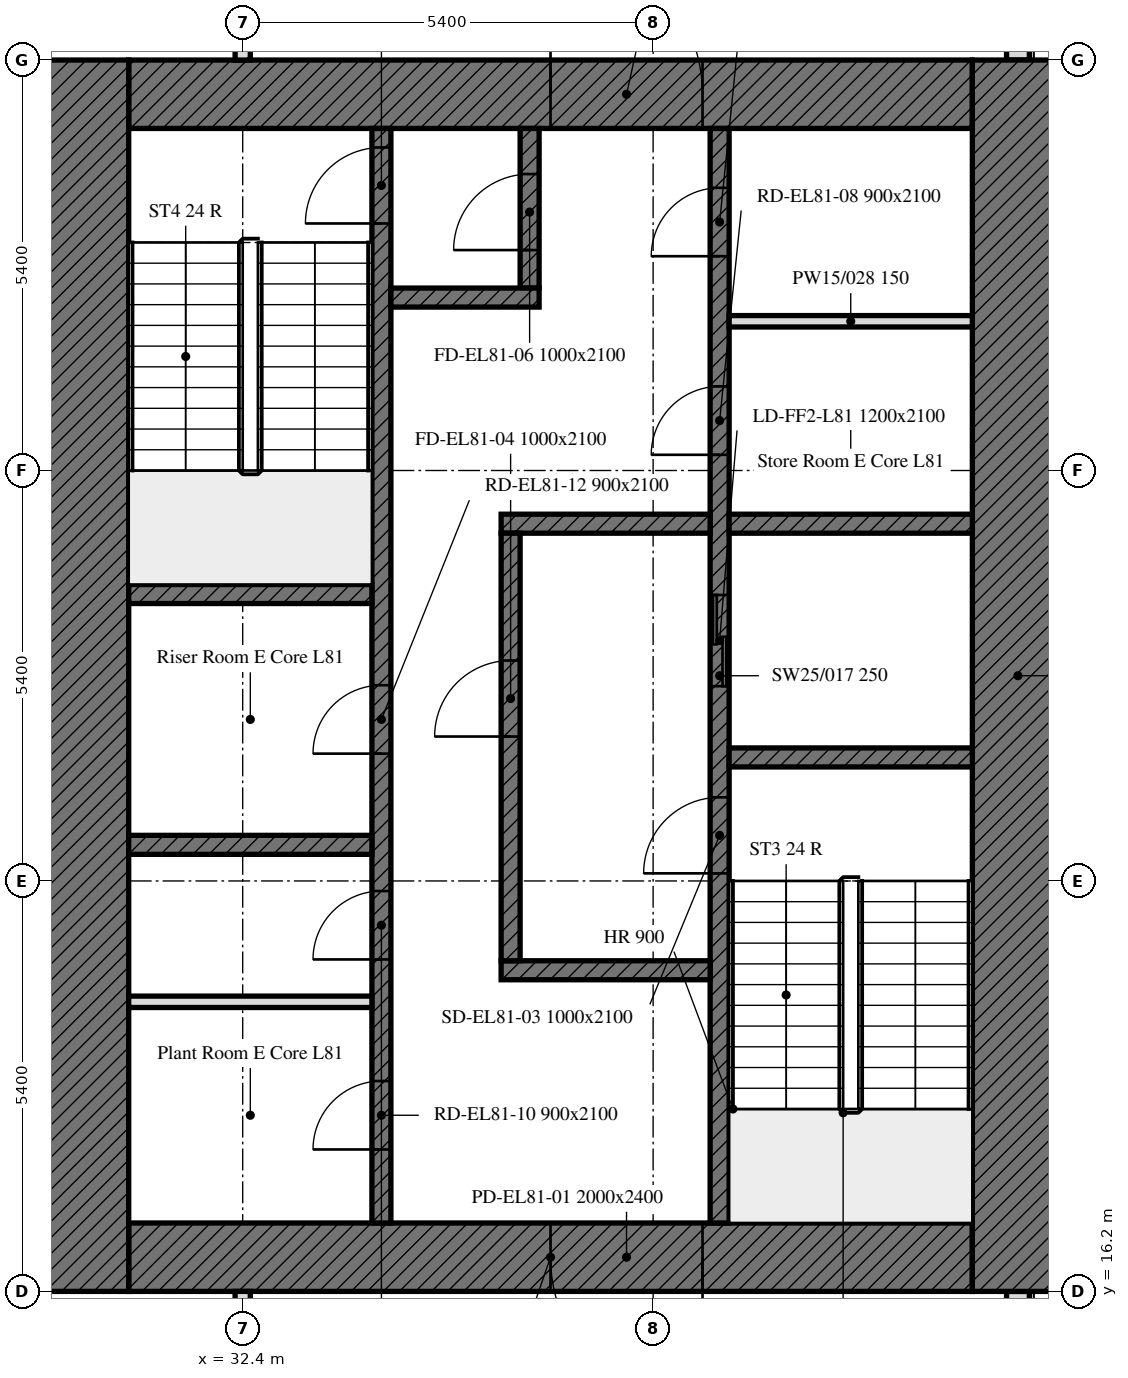
"""IFC4 building model, lengths in metres.
Left out: names, types, materials, properties, quantities, classifications, styles, units other than length and angle.
Written with IfcOpenShell. Run it as: python <this file> out.ifc"""

import sys

from ifc_helpers import new_model, si_unit, direction, frame, frame_2d, origin, place, context, subcontext, project, spatial, polyline, rectangle, outline, extrude, element, fill, save


model = new_model("IFC4")
c1 = context("Model", 3, precision=1e-05, world=origin(), true_north=direction((0.0, 1.0)))
c2 = subcontext(c1, "Body", "Model", "MODEL_VIEW")
j1 = project(units=[si_unit("LENGTHUNIT", "METRE"), si_unit("PLANEANGLEUNIT", "RADIAN")], contexts=[c1])
p1 = place(None, origin())
s1 = spatial("IfcSite", under=j1, at=p1, CompositionType="ELEMENT")
p2 = place(p1, origin())
s2 = spatial("IfcBuilding", under=s1, at=p2, CompositionType="ELEMENT")
p3 = place(p2, frame((0.0, 0.0, 326.2)))
s3 = spatial("IfcBuildingStorey", under=s2, at=p3, CompositionType="ELEMENT", Elevation=326.2)
p4 = place(p3, frame((42.6, 10.986, 0.0), z_axis=(0.0, 0.0, 1.0), x_axis=(0.0, 1.0, 0.0)))
e1 = element("IfcWall", 1, at=p4, inside=s3, PredefinedType="SOLIDWALL", context=c2, shape_type="SweptSolid", body=[
    extrude(outline(polyline([(0.0, 0.0), (5.214, 0.0), (5.214, 4.2), (4.634, 4.2), (4.055, 4.2), (3.476, 4.2), (2.896, 4.2), (2.317, 4.2), (1.738, 4.2), (1.159, 4.2), (0.579, 4.2), (0.0, 4.2), (0.0, 0.0)])), frame((0.0, 0.15, 0.0), z_axis=(0.0, -1.0, 0.0), x_axis=(1.0, 0.0, 0.0)), (0.0, 0.0, 1.0), 0.3),
])
p5 = place(p4, frame((1.014, 0.0, 0.6)))
e2 = element("IfcOpeningElement", 2, at=p5, cuts=e1, PredefinedType="OPENING", context=c2, shape_type="SweptSolid", body=[
    extrude(rectangle(XDim=3.0, YDim=1.8, at=frame_2d((1.5, 0.9))), frame((0.0, 0.16, 0.0), z_axis=(0.0, -1.0, 0.0), x_axis=(1.0, 0.0, 0.0)), (0.0, 0.0, 1.0), 0.32),
])
p6 = place(p3, frame((42.6, 32.4, 0.0), z_axis=(0.0, 0.0, 1.0), x_axis=(0.0, 1.0, 0.0)))
e3 = element("IfcWall", 3, at=p6, inside=s3, PredefinedType="SOLIDWALL", context=c2, shape_type="SweptSolid", body=[
    extrude(outline(polyline([(0.0, 0.0), (10.614, 0.0), (10.614, 4.2), (10.024, 4.2), (9.434, 4.2), (8.845, 4.2), (8.255, 4.2), (7.665, 4.2), (7.076, 4.2), (6.486, 4.2), (5.896, 4.2), (5.307, 4.2), (4.717, 4.2), (4.127, 4.2), (3.538, 4.2), (2.948, 4.2), (2.359, 4.2), (1.769, 4.2), (1.179, 4.2), (0.59, 4.2), (0.0, 4.2), (0.0, 0.0)])), frame((0.0, 0.15, 0.0), z_axis=(0.0, -1.0, 0.0), x_axis=(1.0, 0.0, 0.0)), (0.0, 0.0, 1.0), 0.3),
])
p7 = place(p6, frame((1.2, 0.0, 0.6)))
e4 = element("IfcOpeningElement", 4, at=p7, cuts=e3, PredefinedType="OPENING", context=c2, shape_type="SweptSolid", body=[
    extrude(rectangle(XDim=3.0, YDim=1.8, at=frame_2d((1.5, 0.9))), frame((0.0, 0.16, 0.0), z_axis=(0.0, -1.0, 0.0), x_axis=(1.0, 0.0, 0.0)), (0.0, 0.0, 1.0), 0.32),
])
p8 = place(p6, frame((7.396, 0.0, 0.6)))
e5 = element("IfcOpeningElement", 5, at=p8, cuts=e3, PredefinedType="OPENING", context=c2, shape_type="SweptSolid", body=[
    extrude(rectangle(XDim=1.4, YDim=1.8, at=frame_2d((0.7, 0.9))), frame((0.0, 0.16, 0.0), z_axis=(0.0, -1.0, 0.0), x_axis=(1.0, 0.0, 0.0)), (0.0, 0.0, 1.0), 0.32),
])
p9 = place(p3, frame((42.0, 16.65, 0.0), z_axis=(0.0, 0.0, 1.0), x_axis=(-1.0, 0.0, 0.0)))
e6 = element("IfcWall", 6, at=p9, inside=s3, PredefinedType="SOLIDWALL", context=c2, shape_type="SweptSolid", body=[
    extrude(rectangle(XDim=11.1, YDim=0.9, at=frame_2d((5.55, 0.0))), origin(), (0.0, 0.0, 1.0), 4.2),
])
p10 = place(p9, frame((3.55, 0.0, 0.0)))
e7 = element("IfcOpeningElement", 7, at=p10, cuts=e6, PredefinedType="OPENING", context=c2, shape_type="SweptSolid", body=[
    extrude(rectangle(XDim=2.0, YDim=2.4, at=frame_2d((1.0, 1.2))), frame((0.0, 0.45, 0.0), z_axis=(0.0, -1.0, 0.0), x_axis=(1.0, 0.0, 0.0)), (0.0, 0.0, 1.0), 0.9),
])
p11 = place(p3, frame((30.9, 31.95, 0.0), z_axis=(0.0, 0.0, 1.0), x_axis=(1.0, 0.0, 0.0)))
e8 = element("IfcWall", 8, at=p11, inside=s3, PredefinedType="SOLIDWALL", context=c2, shape_type="SweptSolid", body=[
    extrude(rectangle(XDim=11.1, YDim=0.9, at=frame_2d((5.55, 0.0))), origin(), (0.0, 0.0, 1.0), 4.2),
])
p12 = place(p11, frame((5.55, 0.0, 0.0)))
e9 = element("IfcOpeningElement", 9, at=p12, cuts=e8, PredefinedType="OPENING", context=c2, shape_type="SweptSolid", body=[
    extrude(rectangle(XDim=2.0, YDim=2.4, at=frame_2d((1.0, 1.2))), frame((0.0, 0.45, 0.0), z_axis=(0.0, -1.0, 0.0), x_axis=(1.0, 0.0, 0.0)), (0.0, 0.0, 1.0), 0.9),
])
for number, where, z_axis, x_axis in (
    (10, (42.6, 32.4, 0.0), (0.0, 0.0, 1.0), (0.0, -1.0, 0.0)),
    (11, (30.3, 16.2, 0.0), (0.0, 0.0, 1.0), (0.0, 1.0, 0.0)),
):
    element("IfcWall", number, at=place(p3, frame(where, z_axis=z_axis, x_axis=x_axis)), inside=s3, PredefinedType="SOLIDWALL", context=c2, shape_type="SweptSolid", body=[
        extrude(rectangle(XDim=16.2, YDim=1.2, at=frame_2d((8.1, 0.0))), origin(), (0.0, 0.0, 1.0), 4.2),
    ])
p13 = place(p3, frame((38.675, 17.1, 0.0), z_axis=(0.0, 0.0, 1.0), x_axis=(0.0, 1.0, 0.0)))
e12 = element("IfcWall", 12, at=p13, inside=s3, PredefinedType="SOLIDWALL", context=c2, shape_type="SweptSolid", body=[
    extrude(rectangle(XDim=14.4, YDim=0.25, at=frame_2d((7.2, 0.0))), origin(), (0.0, 0.0, 1.0), 4.2),
])
p14 = place(p13, frame((4.6, 0.0, 0.0)))
e13 = element("IfcOpeningElement", 13, at=p14, cuts=e12, PredefinedType="OPENING", context=c2, shape_type="SweptSolid", body=[
    extrude(rectangle(XDim=1.0, YDim=2.1, at=frame_2d((0.5, 1.05))), frame((0.0, 0.125, 0.0), z_axis=(0.0, -1.0, 0.0), x_axis=(1.0, 0.0, 0.0)), (0.0, 0.0, 1.0), 0.25),
])
p15 = place(p13, frame((7.062, 0.0, 0.0)))
e14 = element("IfcOpeningElement", 14, at=p15, cuts=e12, PredefinedType="OPENING", context=c2, shape_type="SweptSolid", body=[
    extrude(rectangle(XDim=1.2, YDim=2.1, at=frame_2d((0.6, 1.05))), frame((0.0, 0.125, 0.0), z_axis=(0.0, -1.0, 0.0), x_axis=(1.0, 0.0, 0.0)), (0.0, 0.0, 1.0), 0.25),
])
p16 = place(p13, frame((10.106, 0.0, 0.0)))
e15 = element("IfcOpeningElement", 15, at=p16, cuts=e12, PredefinedType="OPENING", context=c2, shape_type="SweptSolid", body=[
    extrude(rectangle(XDim=0.9, YDim=2.1, at=frame_2d((0.45, 1.05))), frame((0.0, 0.125, 0.0), z_axis=(0.0, -1.0, 0.0), x_axis=(1.0, 0.0, 0.0)), (0.0, 0.0, 1.0), 0.25),
])
p17 = place(p13, frame((12.719, 0.0, 0.0)))
e16 = element("IfcOpeningElement", 16, at=p17, cuts=e12, PredefinedType="OPENING", context=c2, shape_type="SweptSolid", body=[
    extrude(rectangle(XDim=0.9, YDim=2.1, at=frame_2d((0.45, 1.05))), frame((0.0, 0.125, 0.0), z_axis=(0.0, -1.0, 0.0), x_axis=(1.0, 0.0, 0.0)), (0.0, 0.0, 1.0), 0.25),
])
p18 = place(p3, frame((34.225, 17.1, 0.0), z_axis=(0.0, 0.0, 1.0), x_axis=(0.0, 1.0, 0.0)))
e17 = element("IfcWall", 17, at=p18, inside=s3, PredefinedType="SOLIDWALL", context=c2, shape_type="SweptSolid", body=[
    extrude(rectangle(XDim=14.4, YDim=0.25, at=frame_2d((7.2, 0.0))), origin(), (0.0, 0.0, 1.0), 4.2),
])
p19 = place(p18, frame((13.15, 0.0, 0.0)))
e18 = element("IfcOpeningElement", 18, at=p19, cuts=e17, PredefinedType="OPENING", context=c2, shape_type="SweptSolid", body=[
    extrude(rectangle(XDim=1.0, YDim=2.1, at=frame_2d((0.5, 1.05))), frame((0.0, 0.125, 0.0), z_axis=(0.0, -1.0, 0.0), x_axis=(1.0, 0.0, 0.0)), (0.0, 0.0, 1.0), 0.25),
])
p20 = place(p18, frame((0.968, 0.0, 0.0)))
e19 = element("IfcOpeningElement", 19, at=p20, cuts=e17, PredefinedType="OPENING", context=c2, shape_type="SweptSolid", body=[
    extrude(rectangle(XDim=0.9, YDim=2.1, at=frame_2d((0.45, 1.05))), frame((0.0, 0.125, 0.0), z_axis=(0.0, -1.0, 0.0), x_axis=(1.0, 0.0, 0.0)), (0.0, 0.0, 1.0), 0.25),
])
p21 = place(p18, frame((3.468, 0.0, 0.0)))
e20 = element("IfcOpeningElement", 20, at=p21, cuts=e17, PredefinedType="OPENING", context=c2, shape_type="SweptSolid", body=[
    extrude(rectangle(XDim=0.9, YDim=2.1, at=frame_2d((0.45, 1.05))), frame((0.0, 0.125, 0.0), z_axis=(0.0, -1.0, 0.0), x_axis=(1.0, 0.0, 0.0)), (0.0, 0.0, 1.0), 0.25),
])
p22 = place(p18, frame((6.175, 0.0, 0.0)))
e21 = element("IfcOpeningElement", 21, at=p22, cuts=e17, PredefinedType="OPENING", context=c2, shape_type="SweptSolid", body=[
    extrude(rectangle(XDim=0.9, YDim=2.1, at=frame_2d((0.45, 1.05))), frame((0.0, 0.125, 0.0), z_axis=(0.0, -1.0, 0.0), x_axis=(1.0, 0.0, 0.0)), (0.0, 0.0, 1.0), 0.25),
])
p23 = place(p3, frame((38.8, 23.225, 0.0), z_axis=(0.0, 0.0, 1.0), x_axis=(1.0, 0.0, 0.0)))
e22 = element("IfcWall", 22, at=p23, inside=s3, PredefinedType="SOLIDWALL", context=c2, shape_type="SweptSolid", body=[
    extrude(rectangle(XDim=3.2, YDim=0.25, at=frame_2d((1.6, 0.0))), origin(), (0.0, 0.0, 1.0), 4.2),
])
for number, where, z_axis, x_axis in (
    (23, (30.9, 25.375, 0.0), (0.0, 0.0, 1.0), (1.0, 0.0, 0.0)),
    (24, (30.9, 22.075, 0.0), (0.0, 0.0, 1.0), (1.0, 0.0, 0.0)),
):
    element("IfcWall", number, at=place(p3, frame(where, z_axis=z_axis, x_axis=x_axis)), inside=s3, PredefinedType="SOLIDWALL", context=c2, shape_type="SweptSolid", body=[
        extrude(rectangle(XDim=3.2, YDim=0.25, at=frame_2d((1.6, 0.0))), origin(), (0.0, 0.0, 1.0), 4.2),
    ])
p24 = place(p3, frame((38.8, 26.3, 0.0), z_axis=(0.0, 0.0, 1.0), x_axis=(1.0, 0.0, 0.0)))
e25 = element("IfcWall", 25, at=p24, inside=s3, PredefinedType="SOLIDWALL", context=c2, shape_type="SweptSolid", body=[
    extrude(rectangle(XDim=3.2, YDim=0.25, at=frame_2d((1.6, 0.0))), origin(), (0.0, 0.0, 1.0), 4.2),
])
for number, where, z_axis, x_axis in (
    (26, (35.8, 26.3, 0.0), (0.0, 0.0, 1.0), (1.0, 0.0, 0.0)),
    (27, (35.8, 20.425, 0.0), (0.0, 0.0, 1.0), (1.0, 0.0, 0.0)),
):
    element("IfcWall", number, at=place(p3, frame(where, z_axis=z_axis, x_axis=x_axis)), inside=s3, PredefinedType="SOLIDWALL", context=c2, shape_type="SweptSolid", body=[
        extrude(rectangle(XDim=2.75, YDim=0.25, at=frame_2d((1.375, 0.0))), origin(), (0.0, 0.0, 1.0), 4.2),
    ])
p25 = place(p3, frame((36.175, 29.4, 0.0), z_axis=(0.0, 0.0, 1.0), x_axis=(0.0, 1.0, 0.0)))
e28 = element("IfcWall", 28, at=p25, inside=s3, PredefinedType="SOLIDWALL", context=c2, shape_type="SweptSolid", body=[
    extrude(rectangle(XDim=2.1, YDim=0.25, at=frame_2d((1.05, 0.0))), origin(), (0.0, 0.0, 1.0), 4.2),
])
p26 = place(p25, frame((0.5, 0.0, 0.0)))
e29 = element("IfcOpeningElement", 29, at=p26, cuts=e28, PredefinedType="OPENING", context=c2, shape_type="SweptSolid", body=[
    extrude(rectangle(XDim=1.0, YDim=2.1, at=frame_2d((0.5, 1.05))), frame((0.0, 0.125, 0.0), z_axis=(0.0, -1.0, 0.0), x_axis=(1.0, 0.0, 0.0)), (0.0, 0.0, 1.0), 0.25),
])
p27 = place(p3, frame((34.35, 29.275, 0.0), z_axis=(0.0, 0.0, 1.0), x_axis=(1.0, 0.0, 0.0)))
e30 = element("IfcWall", 30, at=p27, inside=s3, PredefinedType="SOLIDWALL", context=c2, shape_type="SweptSolid", body=[
    extrude(rectangle(XDim=1.95, YDim=0.25, at=frame_2d((0.975, 0.0))), origin(), (0.0, 0.0, 1.0), 4.2),
])
p28 = place(p3, frame((35.925, 20.55, 0.0), z_axis=(0.0, 0.0, 1.0), x_axis=(0.0, 1.0, 0.0)))
e31 = element("IfcWall", 31, at=p28, inside=s3, PredefinedType="SOLIDWALL", context=c2, shape_type="SweptSolid", body=[
    extrude(rectangle(XDim=5.625, YDim=0.25, at=frame_2d((2.812, 0.0))), origin(), (0.0, 0.0, 1.0), 4.2),
])
p29 = place(p28, frame((2.95, 0.0, 0.0)))
e32 = element("IfcOpeningElement", 32, at=p29, cuts=e31, PredefinedType="OPENING", context=c2, shape_type="SweptSolid", body=[
    extrude(rectangle(XDim=1.0, YDim=2.1, at=frame_2d((0.5, 1.05))), frame((0.0, 0.125, 0.0), z_axis=(0.0, -1.0, 0.0), x_axis=(1.0, 0.0, 0.0)), (0.0, 0.0, 1.0), 0.25),
])
p30 = place(p3, frame((38.8, 28.963, 0.0), z_axis=(0.0, 0.0, 1.0), x_axis=(1.0, 0.0, 0.0)))
e33 = element("IfcWall", 33, at=p30, inside=s3, PredefinedType="PARTITIONING", context=c2, shape_type="SweptSolid", body=[
    extrude(rectangle(XDim=3.2, YDim=0.15, at=frame_2d((1.6, 0.0))), origin(), (0.0, 0.0, 1.0), 4.2),
])
p31 = place(p3, frame((30.9, 20.01, 0.0), z_axis=(0.0, 0.0, 1.0), x_axis=(1.0, 0.0, 0.0)))
e34 = element("IfcWall", 34, at=p31, inside=s3, PredefinedType="PARTITIONING", context=c2, shape_type="SweptSolid", body=[
    extrude(rectangle(XDim=3.2, YDim=0.15, at=frame_2d((1.6, 0.0))), origin(), (0.0, 0.0, 1.0), 4.2),
])
p32 = place(p3, frame((32.4, 32.4, 0.0), z_axis=(0.0, 0.0, 1.0), x_axis=(0.0, 1.0, 0.0)))
e35 = element("IfcWall", 35, at=p32, inside=s3, PredefinedType="PARTITIONING", context=c2, shape_type="SweptSolid", body=[
    extrude(rectangle(XDim=5.105, YDim=0.2, at=frame_2d((2.552, 0.0))), origin(), (0.0, 0.0, 1.0), 3.45),
])
p33 = place(p3, frame((32.4, 13.15, 0.0), z_axis=(0.0, 0.0, 1.0), x_axis=(0.0, 1.0, 0.0)))
e36 = element("IfcWall", 36, at=p33, inside=s3, PredefinedType="PARTITIONING", context=c2, shape_type="SweptSolid", body=[
    extrude(rectangle(XDim=3.05, YDim=0.2, at=frame_2d((1.525, 0.0))), origin(), (0.0, 0.0, 1.0), 4.2),
])
p34 = place(p10, origin())
e37 = element("IfcDoor", 37, at=p34, inside=s3, OperationType="DOUBLE_DOOR_SINGLE_SWING", PredefinedType="DOOR", context=c2, shape_type="SweptSolid", body=[
    extrude(rectangle(XDim=2.0, YDim=2.4, at=frame_2d((1.0, 1.2))), frame((0.0, 0.025, 0.0), z_axis=(0.0, -1.0, 0.0), x_axis=(1.0, 0.0, 0.0)), (0.0, 0.0, 1.0), 0.05),
])
fill(e7, e37)
p35 = place(p12, origin())
e38 = element("IfcDoor", 38, at=p35, inside=s3, OperationType="DOUBLE_DOOR_SINGLE_SWING", PredefinedType="DOOR", context=c2, shape_type="SweptSolid", body=[
    extrude(rectangle(XDim=2.0, YDim=2.4, at=frame_2d((1.0, 1.2))), frame((0.0, 0.025, 0.0), z_axis=(0.0, -1.0, 0.0), x_axis=(1.0, 0.0, 0.0)), (0.0, 0.0, 1.0), 0.05),
])
fill(e9, e38)
p36 = place(p14, origin())
e39 = element("IfcDoor", 39, at=p36, inside=s3, OperationType="SINGLE_SWING_LEFT", PredefinedType="DOOR", context=c2, shape_type="SweptSolid", body=[
    extrude(rectangle(XDim=1.0, YDim=2.1, at=frame_2d((0.5, 1.05))), frame((0.0, 0.025, 0.0), z_axis=(0.0, -1.0, 0.0), x_axis=(1.0, 0.0, 0.0)), (0.0, 0.0, 1.0), 0.05),
])
fill(e13, e39)
p37 = place(p29, origin())
e40 = element("IfcDoor", 40, at=p37, inside=s3, OperationType="SINGLE_SWING_LEFT", PredefinedType="DOOR", context=c2, shape_type="SweptSolid", body=[
    extrude(rectangle(XDim=1.0, YDim=2.1, at=frame_2d((0.5, 1.05))), frame((0.0, 0.025, 0.0), z_axis=(0.0, -1.0, 0.0), x_axis=(1.0, 0.0, 0.0)), (0.0, 0.0, 1.0), 0.05),
])
fill(e32, e40)
p38 = place(p19, origin())
e41 = element("IfcDoor", 41, at=p38, inside=s3, OperationType="SINGLE_SWING_LEFT", PredefinedType="DOOR", context=c2, shape_type="SweptSolid", body=[
    extrude(rectangle(XDim=1.0, YDim=2.1, at=frame_2d((0.5, 1.05))), frame((0.0, 0.025, 0.0), z_axis=(0.0, -1.0, 0.0), x_axis=(1.0, 0.0, 0.0)), (0.0, 0.0, 1.0), 0.05),
])
fill(e18, e41)
p39 = place(p26, origin())
e42 = element("IfcDoor", 42, at=p39, inside=s3, OperationType="SINGLE_SWING_LEFT", PredefinedType="DOOR", context=c2, shape_type="SweptSolid", body=[
    extrude(rectangle(XDim=1.0, YDim=2.1, at=frame_2d((0.5, 1.05))), frame((0.0, 0.025, 0.0), z_axis=(0.0, -1.0, 0.0), x_axis=(1.0, 0.0, 0.0)), (0.0, 0.0, 1.0), 0.05),
])
fill(e29, e42)
p40 = place(p15, origin())
e43 = element("IfcDoor", 43, at=p40, inside=s3, OperationType="DOUBLE_DOOR_SLIDING", PredefinedType="DOOR", context=c2, shape_type="SweptSolid", body=[
    extrude(rectangle(XDim=1.2, YDim=2.1, at=frame_2d((0.6, 1.05))), frame((0.0, 0.025, 0.0), z_axis=(0.0, -1.0, 0.0), x_axis=(1.0, 0.0, 0.0)), (0.0, 0.0, 1.0), 0.05),
])
fill(e14, e43)
p41 = place(p16, origin())
e44 = element("IfcDoor", 44, at=p41, inside=s3, OperationType="SINGLE_SWING_LEFT", PredefinedType="DOOR", context=c2, shape_type="SweptSolid", body=[
    extrude(rectangle(XDim=0.9, YDim=2.1, at=frame_2d((0.45, 1.05))), frame((0.0, 0.025, 0.0), z_axis=(0.0, -1.0, 0.0), x_axis=(1.0, 0.0, 0.0)), (0.0, 0.0, 1.0), 0.05),
])
fill(e15, e44)
p42 = place(p17, origin())
e45 = element("IfcDoor", 45, at=p42, inside=s3, OperationType="SINGLE_SWING_LEFT", PredefinedType="DOOR", context=c2, shape_type="SweptSolid", body=[
    extrude(rectangle(XDim=0.9, YDim=2.1, at=frame_2d((0.45, 1.05))), frame((0.0, 0.025, 0.0), z_axis=(0.0, -1.0, 0.0), x_axis=(1.0, 0.0, 0.0)), (0.0, 0.0, 1.0), 0.05),
])
fill(e16, e45)
p43 = place(p20, origin())
e46 = element("IfcDoor", 46, at=p43, inside=s3, OperationType="SINGLE_SWING_LEFT", PredefinedType="DOOR", context=c2, shape_type="SweptSolid", body=[
    extrude(rectangle(XDim=0.9, YDim=2.1, at=frame_2d((0.45, 1.05))), frame((0.0, 0.025, 0.0), z_axis=(0.0, -1.0, 0.0), x_axis=(1.0, 0.0, 0.0)), (0.0, 0.0, 1.0), 0.05),
])
fill(e19, e46)
p44 = place(p21, origin())
e47 = element("IfcDoor", 47, at=p44, inside=s3, OperationType="SINGLE_SWING_LEFT", PredefinedType="DOOR", context=c2, shape_type="SweptSolid", body=[
    extrude(rectangle(XDim=0.9, YDim=2.1, at=frame_2d((0.45, 1.05))), frame((0.0, 0.025, 0.0), z_axis=(0.0, -1.0, 0.0), x_axis=(1.0, 0.0, 0.0)), (0.0, 0.0, 1.0), 0.05),
])
fill(e20, e47)
p45 = place(p22, origin())
e48 = element("IfcDoor", 48, at=p45, inside=s3, OperationType="SINGLE_SWING_LEFT", PredefinedType="DOOR", context=c2, shape_type="SweptSolid", body=[
    extrude(rectangle(XDim=0.9, YDim=2.1, at=frame_2d((0.45, 1.05))), frame((0.0, 0.025, 0.0), z_axis=(0.0, -1.0, 0.0), x_axis=(1.0, 0.0, 0.0)), (0.0, 0.0, 1.0), 0.05),
])
fill(e21, e48)
save(model, sys.argv[1])
